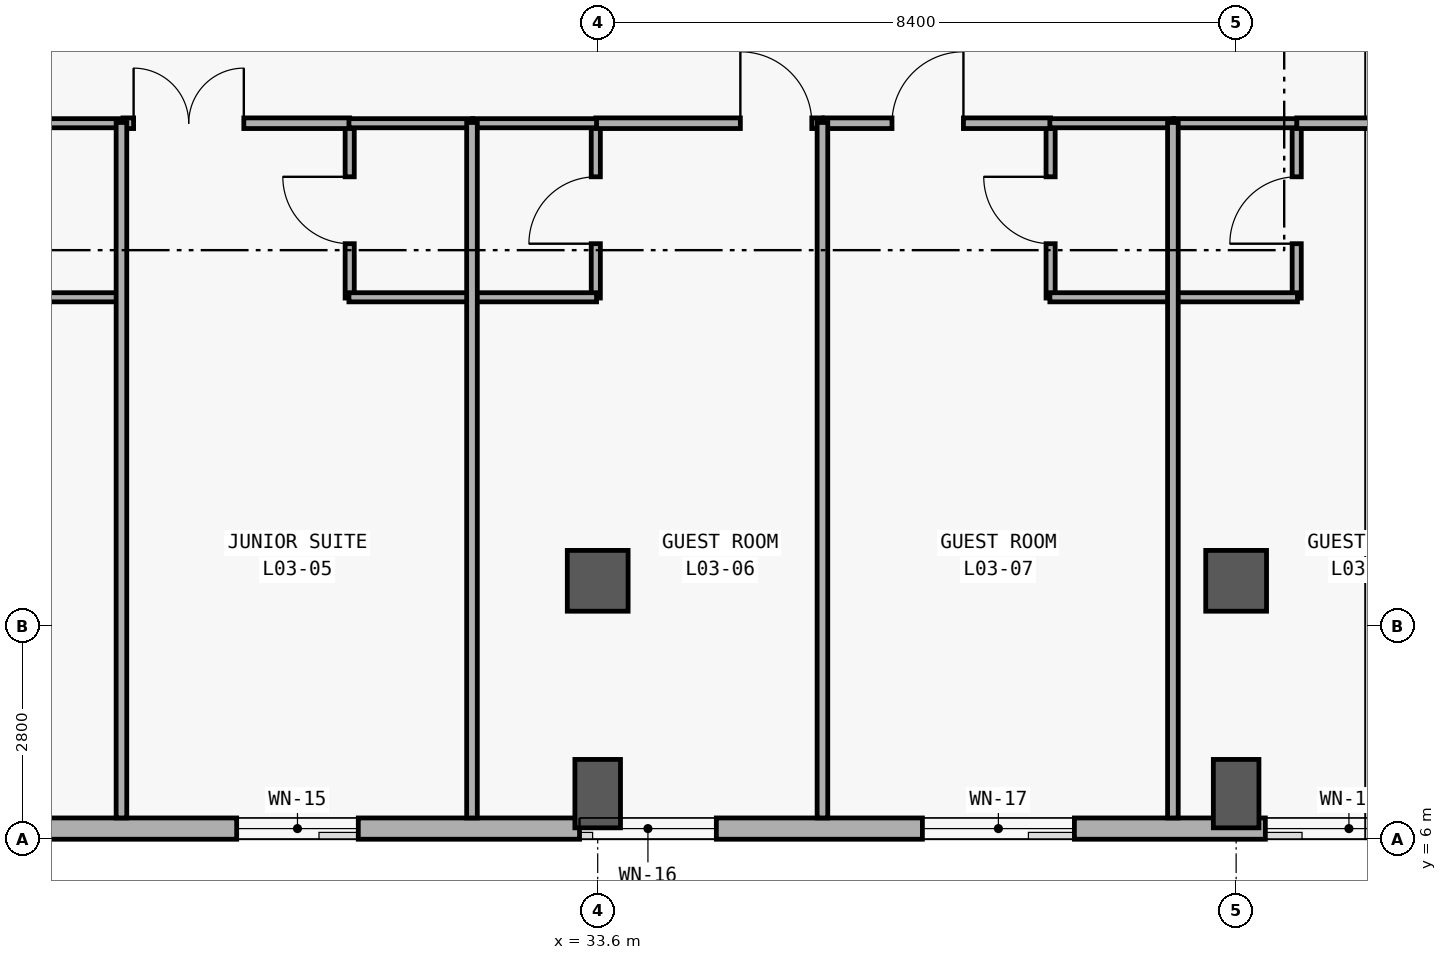
"""IFC4 building model, lengths in metres.
Left out: names, types, materials, properties, quantities, classifications, styles, units other than length and angle.
Written with IfcOpenShell. Run it as: python <this file> out.ifc"""

import sys

from ifc_helpers import new_model, si_unit, direction, frame, frame_2d, origin, origin_2d, place, context, subcontext, project, spatial, rectangle, extrude, element, fill, save


model = new_model("IFC4")
c1 = context("Model", 3, precision=1e-05, world=origin(), true_north=direction((0.0, 1.0)))
c2 = subcontext(c1, "Body", "Model", "MODEL_VIEW")
j1 = project(units=[si_unit("LENGTHUNIT", "METRE"), si_unit("PLANEANGLEUNIT", "RADIAN")], contexts=[c1])
p1 = place(None, origin())
s1 = spatial("IfcSite", under=j1, at=p1, CompositionType="ELEMENT")
p2 = place(p1, origin())
s2 = spatial("IfcBuilding", under=s1, at=p2, CompositionType="ELEMENT")
p3 = place(p2, frame((0.0, 0.0, 15.0)))
s3 = spatial("IfcBuildingStorey", under=s2, at=p3, CompositionType="ELEMENT", Elevation=15.0)
p4 = place(p3, frame((33.6, 6.6, 0.0), z_axis=(0.0, 0.0, 1.0), x_axis=(0.0, 1.0, 0.0)))
e1 = element("IfcColumn", 1, at=p4, inside=s3, PredefinedType="COLUMN", context=c2, shape_type="SweptSolid", body=[
    extrude(rectangle(XDim=0.6, YDim=0.9, at=origin_2d()), origin(), (0.0, 0.0, 1.0), 4.2),
])
p5 = place(p3, frame((33.6, 9.4, 0.0), z_axis=(0.0, 0.0, 1.0), x_axis=(1.0, 0.0, 0.0)))
e2 = element("IfcColumn", 2, at=p5, inside=s3, PredefinedType="COLUMN", context=c2, shape_type="SweptSolid", body=[
    extrude(rectangle(XDim=0.8, YDim=0.8, at=origin_2d()), origin(), (0.0, 0.0, 1.0), 4.2),
])
p6 = place(p3, frame((42.0, 6.6, 0.0), z_axis=(0.0, 0.0, 1.0), x_axis=(0.0, 1.0, 0.0)))
e3 = element("IfcColumn", 3, at=p6, inside=s3, PredefinedType="COLUMN", context=c2, shape_type="SweptSolid", body=[
    extrude(rectangle(XDim=0.6, YDim=0.9, at=origin_2d()), origin(), (0.0, 0.0, 1.0), 4.2),
])
p7 = place(p3, frame((42.0, 9.4, 0.0), z_axis=(0.0, 0.0, 1.0), x_axis=(1.0, 0.0, 0.0)))
e4 = element("IfcColumn", 4, at=p7, inside=s3, PredefinedType="COLUMN", context=c2, shape_type="SweptSolid", body=[
    extrude(rectangle(XDim=0.8, YDim=0.8, at=origin_2d()), origin(), (0.0, 0.0, 1.0), 4.2),
])
p8 = place(p3, frame((92.12, 6.14, 0.0), z_axis=(0.0, 0.0, 1.0), x_axis=(-1.0, 0.0, 0.0)))
e5 = element("IfcWall", 5, at=p8, inside=s3, PredefinedType="SOLIDWALL", context=c2, shape_type="SweptSolid", body=[
    extrude(rectangle(XDim=83.44, YDim=0.28, at=frame_2d((41.72, 0.0))), origin(), (0.0, 0.0, 1.0), 3.92),
])
p9 = place(p8, frame((79.49, 0.0, 0.85)))
e6 = element("IfcOpeningElement", 6, at=p9, cuts=e5, PredefinedType="OPENING", context=c2, shape_type="SweptSolid", body=[
    extrude(rectangle(XDim=2.85, YDim=1.85, at=frame_2d((1.425, 0.925))), frame((0.0, 0.15, 0.0), z_axis=(0.0, -1.0, 0.0), x_axis=(1.0, 0.0, 0.0)), (0.0, 0.0, 1.0), 0.3),
])
p10 = place(p8, frame((74.704, 0.0, 0.85)))
e7 = element("IfcOpeningElement", 7, at=p10, cuts=e5, PredefinedType="OPENING", context=c2, shape_type="SweptSolid", body=[
    extrude(rectangle(XDim=3.2, YDim=1.95, at=frame_2d((1.6, 0.975))), frame((0.0, 0.15, 0.0), z_axis=(0.0, -1.0, 0.0), x_axis=(1.0, 0.0, 0.0)), (0.0, 0.0, 1.0), 0.3),
])
p11 = place(p8, frame((69.942, 0.0, 0.85)))
e8 = element("IfcOpeningElement", 8, at=p11, cuts=e5, PredefinedType="OPENING", context=c2, shape_type="SweptSolid", body=[
    extrude(rectangle(XDim=3.5, YDim=2.0, at=frame_2d((1.75, 1.0))), frame((0.0, 0.15, 0.0), z_axis=(0.0, -1.0, 0.0), x_axis=(1.0, 0.0, 0.0)), (0.0, 0.0, 1.0), 0.3),
])
p12 = place(p8, frame((66.382, 0.0, 0.85)))
e9 = element("IfcOpeningElement", 9, at=p12, cuts=e5, PredefinedType="OPENING", context=c2, shape_type="SweptSolid", body=[
    extrude(rectangle(XDim=1.4, YDim=1.6, at=frame_2d((0.7, 0.8))), frame((0.0, 0.15, 0.0), z_axis=(0.0, -1.0, 0.0), x_axis=(1.0, 0.0, 0.0)), (0.0, 0.0, 1.0), 0.3),
])
p13 = place(p8, frame((61.67, 0.0, 0.85)))
e10 = element("IfcOpeningElement", 10, at=p13, cuts=e5, PredefinedType="OPENING", context=c2, shape_type="SweptSolid", body=[
    extrude(rectangle(XDim=1.6, YDim=1.6, at=frame_2d((0.8, 0.8))), frame((0.0, 0.15, 0.0), z_axis=(0.0, -1.0, 0.0), x_axis=(1.0, 0.0, 0.0)), (0.0, 0.0, 1.0), 0.3),
])
p14 = place(p8, frame((56.959, 0.0, 0.85)))
e11 = element("IfcOpeningElement", 11, at=p14, cuts=e5, PredefinedType="OPENING", context=c2, shape_type="SweptSolid", body=[
    extrude(rectangle(XDim=1.8, YDim=1.6, at=frame_2d((0.9, 0.8))), frame((0.0, 0.15, 0.0), z_axis=(0.0, -1.0, 0.0), x_axis=(1.0, 0.0, 0.0)), (0.0, 0.0, 1.0), 0.3),
])
p15 = place(p8, frame((52.248, 0.0, 0.85)))
e12 = element("IfcOpeningElement", 12, at=p15, cuts=e5, PredefinedType="OPENING", context=c2, shape_type="SweptSolid", body=[
    extrude(rectangle(XDim=2.0, YDim=1.65, at=frame_2d((1.0, 0.825))), frame((0.0, 0.15, 0.0), z_axis=(0.0, -1.0, 0.0), x_axis=(1.0, 0.0, 0.0)), (0.0, 0.0, 1.0), 0.3),
])
p16 = place(p8, frame((47.536, 0.0, 0.85)))
e13 = element("IfcOpeningElement", 13, at=p16, cuts=e5, PredefinedType="OPENING", context=c2, shape_type="SweptSolid", body=[
    extrude(rectangle(XDim=2.2, YDim=1.65, at=frame_2d((1.1, 0.825))), frame((0.0, 0.15, 0.0), z_axis=(0.0, -1.0, 0.0), x_axis=(1.0, 0.0, 0.0)), (0.0, 0.0, 1.0), 0.3),
])
p17 = place(p8, frame((42.726, 0.0, 0.85)))
e14 = element("IfcOpeningElement", 14, at=p17, cuts=e5, PredefinedType="OPENING", context=c2, shape_type="SweptSolid", body=[
    extrude(rectangle(XDim=2.6, YDim=2.2, at=frame_2d((1.3, 1.1))), frame((0.0, 0.15, 0.0), z_axis=(0.0, -1.0, 0.0), x_axis=(1.0, 0.0, 0.0)), (0.0, 0.0, 1.0), 0.3),
])
p18 = place(p8, frame((37.865, 0.0, 0.85)))
e15 = element("IfcOpeningElement", 15, at=p18, cuts=e5, PredefinedType="OPENING", context=c2, shape_type="SweptSolid", body=[
    extrude(rectangle(XDim=3.1, YDim=2.2, at=frame_2d((1.55, 1.1))), frame((0.0, 0.15, 0.0), z_axis=(0.0, -1.0, 0.0), x_axis=(1.0, 0.0, 0.0)), (0.0, 0.0, 1.0), 0.3),
])
p19 = place(p8, frame((33.004, 0.0, 0.85)))
e16 = element("IfcOpeningElement", 16, at=p19, cuts=e5, PredefinedType="OPENING", context=c2, shape_type="SweptSolid", body=[
    extrude(rectangle(XDim=3.6, YDim=2.3, at=frame_2d((1.8, 1.15))), frame((0.0, 0.15, 0.0), z_axis=(0.0, -1.0, 0.0), x_axis=(1.0, 0.0, 0.0)), (0.0, 0.0, 1.0), 0.3),
])
p20 = place(p8, frame((29.568, 0.0, 0.85)))
e17 = element("IfcOpeningElement", 17, at=p20, cuts=e5, PredefinedType="OPENING", context=c2, shape_type="SweptSolid", body=[
    extrude(rectangle(XDim=1.25, YDim=1.45, at=frame_2d((0.625, 0.725))), frame((0.0, 0.15, 0.0), z_axis=(0.0, -1.0, 0.0), x_axis=(1.0, 0.0, 0.0)), (0.0, 0.0, 1.0), 0.3),
])
p21 = place(p8, frame((24.907, 0.0, 0.85)))
e18 = element("IfcOpeningElement", 18, at=p21, cuts=e5, PredefinedType="OPENING", context=c2, shape_type="SweptSolid", body=[
    extrude(rectangle(XDim=1.35, YDim=1.55, at=frame_2d((0.675, 0.775))), frame((0.0, 0.15, 0.0), z_axis=(0.0, -1.0, 0.0), x_axis=(1.0, 0.0, 0.0)), (0.0, 0.0, 1.0), 0.3),
])
p22 = place(p8, frame((20.245, 0.0, 0.85)))
e19 = element("IfcOpeningElement", 19, at=p22, cuts=e5, PredefinedType="OPENING", context=c2, shape_type="SweptSolid", body=[
    extrude(rectangle(XDim=1.45, YDim=1.65, at=frame_2d((0.725, 0.825))), frame((0.0, 0.15, 0.0), z_axis=(0.0, -1.0, 0.0), x_axis=(1.0, 0.0, 0.0)), (0.0, 0.0, 1.0), 0.3),
])
p23 = place(p8, frame((15.584, 0.0, 0.85)))
e20 = element("IfcOpeningElement", 20, at=p23, cuts=e5, PredefinedType="OPENING", context=c2, shape_type="SweptSolid", body=[
    extrude(rectangle(XDim=1.55, YDim=1.65, at=frame_2d((0.775, 0.825))), frame((0.0, 0.15, 0.0), z_axis=(0.0, -1.0, 0.0), x_axis=(1.0, 0.0, 0.0)), (0.0, 0.0, 1.0), 0.3),
])
p24 = place(p8, frame((10.898, 0.0, 0.85)))
e21 = element("IfcOpeningElement", 21, at=p24, cuts=e5, PredefinedType="OPENING", context=c2, shape_type="SweptSolid", body=[
    extrude(rectangle(XDim=1.7, YDim=2.0, at=frame_2d((0.85, 1.0))), frame((0.0, 0.15, 0.0), z_axis=(0.0, -1.0, 0.0), x_axis=(1.0, 0.0, 0.0)), (0.0, 0.0, 1.0), 0.3),
])
p25 = place(p8, frame((5.987, 0.0, 0.85)))
e22 = element("IfcOpeningElement", 22, at=p25, cuts=e5, PredefinedType="OPENING", context=c2, shape_type="SweptSolid", body=[
    extrude(rectangle(XDim=2.3, YDim=2.05, at=frame_2d((1.15, 1.025))), frame((0.0, 0.15, 0.0), z_axis=(0.0, -1.0, 0.0), x_axis=(1.0, 0.0, 0.0)), (0.0, 0.0, 1.0), 0.3),
])
p26 = place(p8, frame((1.151, 0.0, 0.85)))
e23 = element("IfcOpeningElement", 23, at=p26, cuts=e5, PredefinedType="OPENING", context=c2, shape_type="SweptSolid", body=[
    extrude(rectangle(XDim=2.75, YDim=2.1, at=frame_2d((1.375, 1.05))), frame((0.0, 0.15, 0.0), z_axis=(0.0, -1.0, 0.0), x_axis=(1.0, 0.0, 0.0)), (0.0, 0.0, 1.0), 0.3),
])
p27 = place(p3, frame((30.337, 13.12, 0.0), z_axis=(0.0, 0.0, 1.0), x_axis=(0.0, 1.0, 0.0)))
e24 = element("IfcWall", 24, at=p27, inside=s3, PredefinedType="PARTITIONING", context=c2, shape_type="SweptSolid", body=[
    extrude(rectangle(XDim=2.31, YDim=0.12, at=frame_2d((1.155, 0.0))), origin(), (0.0, 0.0, 1.0), 3.02),
])
p28 = place(p27, frame((0.715, 0.0, 0.0)))
e25 = element("IfcOpeningElement", 25, at=p28, cuts=e24, PredefinedType="OPENING", context=c2, shape_type="SweptSolid", body=[
    extrude(rectangle(XDim=0.88, YDim=2.15, at=frame_2d((0.44, 1.075))), frame((0.0, 0.07, 0.0), z_axis=(0.0, -1.0, 0.0), x_axis=(1.0, 0.0, 0.0)), (0.0, 0.0, 1.0), 0.14),
])
p29 = place(p3, frame((33.575, 13.12, 0.0), z_axis=(0.0, 0.0, 1.0), x_axis=(0.0, 1.0, 0.0)))
e26 = element("IfcWall", 26, at=p29, inside=s3, PredefinedType="PARTITIONING", context=c2, shape_type="SweptSolid", body=[
    extrude(rectangle(XDim=2.31, YDim=0.12, at=frame_2d((1.155, 0.0))), origin(), (0.0, 0.0, 1.0), 3.02),
])
p30 = place(p29, frame((0.715, 0.0, 0.0)))
e27 = element("IfcOpeningElement", 27, at=p30, cuts=e26, PredefinedType="OPENING", context=c2, shape_type="SweptSolid", body=[
    extrude(rectangle(XDim=0.88, YDim=2.15, at=frame_2d((0.44, 1.075))), frame((0.0, 0.07, 0.0), z_axis=(0.0, -1.0, 0.0), x_axis=(1.0, 0.0, 0.0)), (0.0, 0.0, 1.0), 0.14),
])
p31 = place(p3, frame((39.559, 13.12, 0.0), z_axis=(0.0, 0.0, 1.0), x_axis=(0.0, 1.0, 0.0)))
e28 = element("IfcWall", 28, at=p31, inside=s3, PredefinedType="PARTITIONING", context=c2, shape_type="SweptSolid", body=[
    extrude(rectangle(XDim=2.31, YDim=0.12, at=frame_2d((1.155, 0.0))), origin(), (0.0, 0.0, 1.0), 3.02),
])
p32 = place(p31, frame((0.715, 0.0, 0.0)))
e29 = element("IfcOpeningElement", 29, at=p32, cuts=e28, PredefinedType="OPENING", context=c2, shape_type="SweptSolid", body=[
    extrude(rectangle(XDim=0.88, YDim=2.15, at=frame_2d((0.44, 1.075))), frame((0.0, 0.07, 0.0), z_axis=(0.0, -1.0, 0.0), x_axis=(1.0, 0.0, 0.0)), (0.0, 0.0, 1.0), 0.14),
])
p33 = place(p3, frame((42.797, 13.12, 0.0), z_axis=(0.0, 0.0, 1.0), x_axis=(0.0, 1.0, 0.0)))
e30 = element("IfcWall", 30, at=p33, inside=s3, PredefinedType="PARTITIONING", context=c2, shape_type="SweptSolid", body=[
    extrude(rectangle(XDim=2.31, YDim=0.12, at=frame_2d((1.155, 0.0))), origin(), (0.0, 0.0, 1.0), 3.02),
])
p34 = place(p33, frame((0.715, 0.0, 0.0)))
e31 = element("IfcOpeningElement", 31, at=p34, cuts=e30, PredefinedType="OPENING", context=c2, shape_type="SweptSolid", body=[
    extrude(rectangle(XDim=0.88, YDim=2.15, at=frame_2d((0.44, 1.075))), frame((0.0, 0.07, 0.0), z_axis=(0.0, -1.0, 0.0), x_axis=(1.0, 0.0, 0.0)), (0.0, 0.0, 1.0), 0.14),
])
p35 = place(p3, frame((27.354, 15.42, 0.0), z_axis=(0.0, 0.0, 1.0), x_axis=(1.0, 0.0, 0.0)))
e32 = element("IfcWall", 32, at=p35, inside=s3, PredefinedType="PARTITIONING", context=c2, shape_type="SweptSolid", body=[
    extrude(rectangle(XDim=2.983, YDim=0.14, at=frame_2d((1.491, 0.0))), origin(), (0.0, 0.0, 1.0), 3.02),
])
p36 = place(p35, frame((0.14, 0.0, 0.0)))
e33 = element("IfcOpeningElement", 33, at=p36, cuts=e32, PredefinedType="OPENING", context=c2, shape_type="SweptSolid", body=[
    extrude(rectangle(XDim=1.45, YDim=2.3, at=frame_2d((0.725, 1.15))), frame((0.0, 0.08, 0.0), z_axis=(0.0, -1.0, 0.0), x_axis=(1.0, 0.0, 0.0)), (0.0, 0.0, 1.0), 0.16),
])
p37 = place(p3, frame((33.575, 15.42, 0.0), z_axis=(0.0, 0.0, 1.0), x_axis=(1.0, 0.0, 0.0)))
e34 = element("IfcWall", 34, at=p37, inside=s3, PredefinedType="PARTITIONING", context=c2, shape_type="SweptSolid", body=[
    extrude(rectangle(XDim=2.982, YDim=0.14, at=frame_2d((1.491, 0.0))), origin(), (0.0, 0.0, 1.0), 3.02),
])
p38 = place(p37, frame((1.902, 0.0, 0.0)))
e35 = element("IfcOpeningElement", 35, at=p38, cuts=e34, PredefinedType="OPENING", context=c2, shape_type="SweptSolid", body=[
    extrude(rectangle(XDim=0.94, YDim=2.2, at=frame_2d((0.47, 1.1))), frame((0.0, 0.08, 0.0), z_axis=(0.0, -1.0, 0.0), x_axis=(1.0, 0.0, 0.0)), (0.0, 0.0, 1.0), 0.16),
])
p39 = place(p3, frame((36.577, 15.42, 0.0), z_axis=(0.0, 0.0, 1.0), x_axis=(1.0, 0.0, 0.0)))
e36 = element("IfcWall", 36, at=p39, inside=s3, PredefinedType="PARTITIONING", context=c2, shape_type="SweptSolid", body=[
    extrude(rectangle(XDim=2.982, YDim=0.14, at=frame_2d((1.491, 0.0))), origin(), (0.0, 0.0, 1.0), 3.02),
])
p40 = place(p39, frame((0.895, 0.0, 0.0)))
e37 = element("IfcOpeningElement", 37, at=p40, cuts=e36, PredefinedType="OPENING", context=c2, shape_type="SweptSolid", body=[
    extrude(rectangle(XDim=0.94, YDim=2.2, at=frame_2d((0.47, 1.1))), frame((0.0, 0.08, 0.0), z_axis=(0.0, -1.0, 0.0), x_axis=(1.0, 0.0, 0.0)), (0.0, 0.0, 1.0), 0.16),
])
p41 = place(p3, frame((42.797, 15.42, 0.0), z_axis=(0.0, 0.0, 1.0), x_axis=(1.0, 0.0, 0.0)))
e38 = element("IfcWall", 38, at=p41, inside=s3, PredefinedType="PARTITIONING", context=c2, shape_type="SweptSolid", body=[
    extrude(rectangle(XDim=2.982, YDim=0.14, at=frame_2d((1.491, 0.0))), origin(), (0.0, 0.0, 1.0), 3.02),
])
p42 = place(p41, frame((1.902, 0.0, 0.0)))
e39 = element("IfcOpeningElement", 39, at=p42, cuts=e38, PredefinedType="OPENING", context=c2, shape_type="SweptSolid", body=[
    extrude(rectangle(XDim=0.94, YDim=2.2, at=frame_2d((0.47, 1.1))), frame((0.0, 0.08, 0.0), z_axis=(0.0, -1.0, 0.0), x_axis=(1.0, 0.0, 0.0)), (0.0, 0.0, 1.0), 0.16),
])
for number, where, z_axis, x_axis in (
    (40, (25.715, 13.13, 0.0), (0.0, 0.0, 1.0), (1.0, 0.0, 0.0)),
    (41, (25.715, 15.42, 0.0), (0.0, 0.0, 1.0), (1.0, 0.0, 0.0)),
):
    element("IfcWall", number, at=place(p3, frame(where, z_axis=z_axis, x_axis=x_axis)), inside=s3, PredefinedType="PARTITIONING", context=c2, shape_type="SweptSolid", body=[
        extrude(rectangle(XDim=1.629, YDim=0.12, at=frame_2d((0.814, 0.0))), origin(), (0.0, 0.0, 1.0), 3.02),
    ])
for number, where, z_axis, x_axis in (
    (42, (30.327, 13.13, 0.0), (0.0, 0.0, 1.0), (1.0, 0.0, 0.0)),
    (43, (30.327, 15.42, 0.0), (0.0, 0.0, 1.0), (1.0, 0.0, 0.0)),
):
    element("IfcWall", number, at=place(p3, frame(where, z_axis=z_axis, x_axis=x_axis)), inside=s3, PredefinedType="PARTITIONING", context=c2, shape_type="SweptSolid", body=[
        extrude(rectangle(XDim=1.629, YDim=0.12, at=frame_2d((0.814, 0.0))), origin(), (0.0, 0.0, 1.0), 3.02),
    ])
for number, where, z_axis, x_axis in (
    (44, (31.956, 13.13, 0.0), (0.0, 0.0, 1.0), (1.0, 0.0, 0.0)),
    (45, (31.956, 15.42, 0.0), (0.0, 0.0, 1.0), (1.0, 0.0, 0.0)),
    (46, (39.549, 13.13, 0.0), (0.0, 0.0, 1.0), (1.0, 0.0, 0.0)),
    (47, (39.549, 15.42, 0.0), (0.0, 0.0, 1.0), (1.0, 0.0, 0.0)),
    (48, (41.178, 13.13, 0.0), (0.0, 0.0, 1.0), (1.0, 0.0, 0.0)),
):
    element("IfcWall", number, at=place(p3, frame(where, z_axis=z_axis, x_axis=x_axis)), inside=s3, PredefinedType="PARTITIONING", context=c2, shape_type="SweptSolid", body=[
        extrude(rectangle(XDim=1.629, YDim=0.12, at=frame_2d((0.814, 0.0))), origin(), (0.0, 0.0, 1.0), 3.02),
    ])
p43 = place(p3, frame((41.178, 15.42, 0.0), z_axis=(0.0, 0.0, 1.0), x_axis=(1.0, 0.0, 0.0)))
e49 = element("IfcWall", 49, at=p43, inside=s3, PredefinedType="PARTITIONING", context=c2, shape_type="SweptSolid", body=[
    extrude(rectangle(XDim=1.619, YDim=0.12, at=frame_2d((0.81, 0.0))), origin(), (0.0, 0.0, 1.0), 3.02),
])
for number, where, z_axis, x_axis in (
    (50, (27.334, 6.28, 0.0), (0.0, 0.0, 1.0), (0.0, 1.0, 0.0)),
    (51, (31.946, 6.28, 0.0), (0.0, 0.0, 1.0), (0.0, 1.0, 0.0)),
    (52, (36.557, 6.28, 0.0), (0.0, 0.0, 1.0), (0.0, 1.0, 0.0)),
    (53, (41.168, 6.28, 0.0), (0.0, 0.0, 1.0), (0.0, 1.0, 0.0)),
):
    element("IfcWall", number, at=place(p3, frame(where, z_axis=z_axis, x_axis=x_axis)), inside=s3, PredefinedType="PARTITIONING", context=c2, shape_type="SweptSolid", body=[
        extrude(rectangle(XDim=9.15, YDim=0.14, at=frame_2d((4.575, 0.0))), origin(), (0.0, 0.0, 1.0), 3.02),
    ])
p44 = place(p13, origin())
e54 = element("IfcWindow", 54, at=p44, inside=s3, PartitioningType="SINGLE_PANEL", PredefinedType="WINDOW", context=c2, shape_type="SweptSolid", body=[
    extrude(rectangle(XDim=1.6, YDim=1.6, at=frame_2d((0.8, 0.8))), frame((0.0, 0.03, 0.0), z_axis=(0.0, -1.0, 0.0), x_axis=(1.0, 0.0, 0.0)), (0.0, 0.0, 1.0), 0.06),
])
fill(e10, e54)
p45 = place(p14, origin())
e55 = element("IfcWindow", 55, at=p45, inside=s3, PartitioningType="SINGLE_PANEL", PredefinedType="WINDOW", context=c2, shape_type="SweptSolid", body=[
    extrude(rectangle(XDim=1.8, YDim=1.6, at=frame_2d((0.9, 0.8))), frame((0.0, 0.03, 0.0), z_axis=(0.0, -1.0, 0.0), x_axis=(1.0, 0.0, 0.0)), (0.0, 0.0, 1.0), 0.06),
])
fill(e11, e55)
p46 = place(p15, origin())
e56 = element("IfcWindow", 56, at=p46, inside=s3, PartitioningType="SINGLE_PANEL", PredefinedType="WINDOW", context=c2, shape_type="SweptSolid", body=[
    extrude(rectangle(XDim=2.0, YDim=1.65, at=frame_2d((1.0, 0.825))), frame((0.0, 0.03, 0.0), z_axis=(0.0, -1.0, 0.0), x_axis=(1.0, 0.0, 0.0)), (0.0, 0.0, 1.0), 0.06),
])
fill(e12, e56)
p47 = place(p16, origin())
e57 = element("IfcWindow", 57, at=p47, inside=s3, PartitioningType="SINGLE_PANEL", PredefinedType="WINDOW", context=c2, shape_type="SweptSolid", body=[
    extrude(rectangle(XDim=2.2, YDim=1.65, at=frame_2d((1.1, 0.825))), frame((0.0, 0.03, 0.0), z_axis=(0.0, -1.0, 0.0), x_axis=(1.0, 0.0, 0.0)), (0.0, 0.0, 1.0), 0.06),
])
fill(e13, e57)
p48 = place(p28, origin())
e58 = element("IfcDoor", 58, at=p48, inside=s3, OperationType="SINGLE_SWING_RIGHT", PredefinedType="DOOR", context=c2, shape_type="SweptSolid", body=[
    extrude(rectangle(XDim=0.88, YDim=2.15, at=frame_2d((0.44, 1.075))), frame((0.0, 0.025, 0.0), z_axis=(0.0, -1.0, 0.0), x_axis=(1.0, 0.0, 0.0)), (0.0, 0.0, 1.0), 0.05),
])
fill(e25, e58)
p49 = place(p30, origin())
e59 = element("IfcDoor", 59, at=p49, inside=s3, OperationType="SINGLE_SWING_LEFT", PredefinedType="DOOR", context=c2, shape_type="SweptSolid", body=[
    extrude(rectangle(XDim=0.88, YDim=2.15, at=frame_2d((0.44, 1.075))), frame((0.0, 0.025, 0.0), z_axis=(0.0, -1.0, 0.0), x_axis=(1.0, 0.0, 0.0)), (0.0, 0.0, 1.0), 0.05),
])
fill(e27, e59)
p50 = place(p32, origin())
e60 = element("IfcDoor", 60, at=p50, inside=s3, OperationType="SINGLE_SWING_RIGHT", PredefinedType="DOOR", context=c2, shape_type="SweptSolid", body=[
    extrude(rectangle(XDim=0.88, YDim=2.15, at=frame_2d((0.44, 1.075))), frame((0.0, 0.025, 0.0), z_axis=(0.0, -1.0, 0.0), x_axis=(1.0, 0.0, 0.0)), (0.0, 0.0, 1.0), 0.05),
])
fill(e29, e60)
p51 = place(p34, origin())
e61 = element("IfcDoor", 61, at=p51, inside=s3, OperationType="SINGLE_SWING_LEFT", PredefinedType="DOOR", context=c2, shape_type="SweptSolid", body=[
    extrude(rectangle(XDim=0.88, YDim=2.15, at=frame_2d((0.44, 1.075))), frame((0.0, 0.025, 0.0), z_axis=(0.0, -1.0, 0.0), x_axis=(1.0, 0.0, 0.0)), (0.0, 0.0, 1.0), 0.05),
])
fill(e31, e61)
p52 = place(p36, origin())
e62 = element("IfcDoor", 62, at=p52, inside=s3, OperationType="DOUBLE_DOOR_SINGLE_SWING", PredefinedType="DOOR", context=c2, shape_type="SweptSolid", body=[
    extrude(rectangle(XDim=1.45, YDim=2.3, at=frame_2d((0.725, 1.15))), frame((0.0, 0.025, 0.0), z_axis=(0.0, -1.0, 0.0), x_axis=(1.0, 0.0, 0.0)), (0.0, 0.0, 1.0), 0.05),
])
fill(e33, e62)
p53 = place(p38, origin())
e63 = element("IfcDoor", 63, at=p53, inside=s3, OperationType="SINGLE_SWING_LEFT", PredefinedType="DOOR", context=c2, shape_type="SweptSolid", body=[
    extrude(rectangle(XDim=0.94, YDim=2.2, at=frame_2d((0.47, 1.1))), frame((0.0, 0.025, 0.0), z_axis=(0.0, -1.0, 0.0), x_axis=(1.0, 0.0, 0.0)), (0.0, 0.0, 1.0), 0.05),
])
fill(e35, e63)
p54 = place(p40, origin())
e64 = element("IfcDoor", 64, at=p54, inside=s3, OperationType="SINGLE_SWING_RIGHT", PredefinedType="DOOR", context=c2, shape_type="SweptSolid", body=[
    extrude(rectangle(XDim=0.94, YDim=2.2, at=frame_2d((0.47, 1.1))), frame((0.0, 0.025, 0.0), z_axis=(0.0, -1.0, 0.0), x_axis=(1.0, 0.0, 0.0)), (0.0, 0.0, 1.0), 0.05),
])
fill(e37, e64)
save(model, sys.argv[1])
